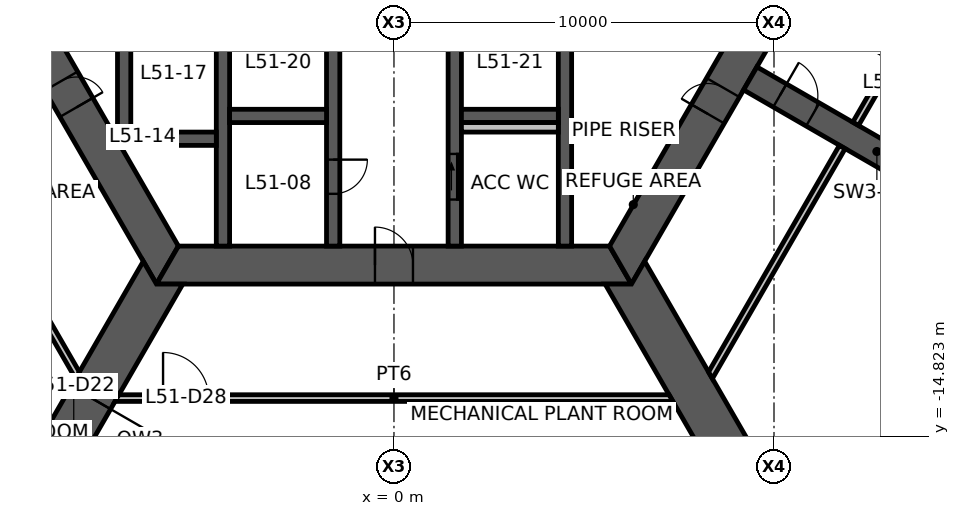
"""IFC4 building model, lengths in metres.
Left out: names, types, materials, properties, quantities, classifications, styles, units other than length and angle.
Written with IfcOpenShell. Run it as: python <this file> out.ifc"""

import sys

from ifc_helpers import new_model, si_unit, direction, frame, frame_2d, origin, place, context, subcontext, project, spatial, polyline, rectangle, outline, extrude, element, fill, save


model = new_model("IFC4")
c1 = context("Model", 3, precision=1e-05, world=origin(), true_north=direction((0.0, 1.0)))
c2 = subcontext(c1, "Body", "Model", "MODEL_VIEW")
j1 = project(units=[si_unit("LENGTHUNIT", "METRE"), si_unit("PLANEANGLEUNIT", "RADIAN")], contexts=[c1])
p1 = place(None, origin())
s1 = spatial("IfcSite", under=j1, at=p1, CompositionType="ELEMENT")
p2 = place(p1, origin())
s2 = spatial("IfcBuilding", under=s1, at=p2, CompositionType="ELEMENT")
p3 = place(p2, frame((0.0, 0.0, 203.3)))
s3 = spatial("IfcBuildingStorey", under=s2, at=p3, CompositionType="ELEMENT", Elevation=203.3)
p4 = place(p3, frame((-11.922, 0.0, 0.0), z_axis=(0.0, 0.0, 1.0), x_axis=(0.500004296715, -0.866022923061, 0.0)))
e1 = element("IfcWall", 1, at=p4, inside=s3, PredefinedType="SHEAR", context=c2, shape_type="SweptSolid", body=[
    extrude(outline(polyline([(-0.289, -0.5), (6.331, -0.5), (7.131, -0.5), (12.211, -0.5), (11.634, 0.5), (7.131, 0.5), (6.331, 0.5), (0.289, 0.5), (-0.289, -0.5)])), origin(), (0.0, 0.0, 1.0), 5.0),
])
p5 = place(p4, frame((6.331, 0.0, 0.0)))
e2 = element("IfcOpeningElement", 2, at=p5, cuts=e1, PredefinedType="OPENING", context=c2, shape_type="SweptSolid", body=[
    extrude(rectangle(XDim=0.8, YDim=2.1, at=frame_2d((0.4, 1.05))), frame((0.0, 0.51, 0.0), z_axis=(0.0, -1.0, 0.0), x_axis=(1.0, 0.0, 0.0)), (0.0, 0.0, 1.0), 1.02),
])
p6 = place(p3, frame((-5.961, -10.325, 0.0), z_axis=(0.0, 0.0, 1.0), x_axis=(1.0, 0.0, 0.0)))
e3 = element("IfcWall", 3, at=p6, inside=s3, PredefinedType="SHEAR", context=c2, shape_type="SweptSolid", body=[
    extrude(outline(polyline([(-0.289, -0.5), (5.461, -0.5), (6.461, -0.5), (12.211, -0.5), (11.634, 0.5), (6.461, 0.5), (5.461, 0.5), (0.289, 0.5), (-0.289, -0.5)])), origin(), (0.0, 0.0, 1.0), 5.0),
])
p7 = place(p6, frame((5.461, 0.0, 0.0)))
e4 = element("IfcOpeningElement", 4, at=p7, cuts=e3, PredefinedType="OPENING", context=c2, shape_type="SweptSolid", body=[
    extrude(rectangle(XDim=1.0, YDim=2.1, at=frame_2d((0.5, 1.05))), frame((0.0, 0.51, 0.0), z_axis=(0.0, -1.0, 0.0), x_axis=(1.0, 0.0, 0.0)), (0.0, 0.0, 1.0), 1.02),
])
p8 = place(p3, frame((5.961, -10.325, 0.0), z_axis=(0.0, 0.0, 1.0), x_axis=(0.500004296715, 0.866022923061, 0.0)))
e5 = element("IfcWall", 5, at=p8, inside=s3, PredefinedType="SHEAR", context=c2, shape_type="SweptSolid", body=[
    extrude(outline(polyline([(-0.289, -0.5), (4.594, -0.5), (5.394, -0.5), (12.211, -0.5), (11.634, 0.5), (5.394, 0.5), (4.594, 0.5), (0.289, 0.5), (-0.289, -0.5)])), origin(), (0.0, 0.0, 1.0), 5.0),
])
p9 = place(p8, frame((4.594, 0.0, 0.0)))
e6 = element("IfcOpeningElement", 6, at=p9, cuts=e5, PredefinedType="OPENING", context=c2, shape_type="SweptSolid", body=[
    extrude(rectangle(XDim=0.8, YDim=2.1, at=frame_2d((0.4, 1.05))), frame((0.0, 0.51, 0.0), z_axis=(0.0, -1.0, 0.0), x_axis=(1.0, 0.0, 0.0)), (0.0, 0.0, 1.0), 1.02),
])
p10 = place(p3, frame((9.375, -5.413, 0.0), z_axis=(0.0, 0.0, 1.0), x_axis=(0.866032377459, -0.499987921047, 0.0)))
e7 = element("IfcWall", 7, at=p10, inside=s3, PredefinedType="SHEAR", context=c2, shape_type="SweptSolid", body=[
    extrude(rectangle(XDim=7.696, YDim=0.7, at=frame_2d((3.848, 0.0))), origin(), (0.0, 0.0, 1.0), 5.0),
])
p11 = place(p10, frame((0.9, 0.0, 0.0)))
e8 = element("IfcOpeningElement", 8, at=p11, cuts=e7, PredefinedType="OPENING", context=c2, shape_type="SweptSolid", body=[
    extrude(rectangle(XDim=1.0, YDim=2.1, at=frame_2d((0.5, 1.05))), frame((0.0, 0.36, 0.0), z_axis=(0.0, -1.0, 0.0), x_axis=(1.0, 0.0, 0.0)), (0.0, 0.0, 1.0), 0.72),
])
p12 = place(p3, frame((-6.25, -10.825, -1.15), z_axis=(0.0, 0.0, 1.0), x_axis=(-0.50000045744, -0.866025139681, 0.0)))
e9 = element("IfcWall", 9, at=p12, inside=s3, PredefinedType="SHEAR", context=c2, shape_type="SweptSolid", body=[
    extrude(outline(polyline([(-0.346, -0.6), (3.453, -0.6), (5.253, -0.6), (7.5, -0.6), (7.5, 0.6), (5.253, 0.6), (3.453, 0.6), (-0.346, 0.6), (0.0, 0.0), (-0.346, -0.6)])), origin(), (0.0, 0.0, 1.0), 6.15),
])
p13 = place(p12, frame((3.453, 0.0, 1.15)))
e10 = element("IfcOpeningElement", 10, at=p13, cuts=e9, PredefinedType="OPENING", context=c2, shape_type="SweptSolid", body=[
    extrude(rectangle(XDim=1.8, YDim=2.4, at=frame_2d((0.9, 1.2))), frame((0.0, 0.61, 0.0), z_axis=(0.0, -1.0, 0.0), x_axis=(1.0, 0.0, 0.0)), (0.0, 0.0, 1.0), 1.22),
])
p14 = place(p3, frame((6.25, -10.825, -1.15), z_axis=(0.0, 0.0, 1.0), x_axis=(0.50000045744, -0.866025139681, 0.0)))
e11 = element("IfcWall", 11, at=p14, inside=s3, PredefinedType="SHEAR", context=c2, shape_type="SweptSolid", body=[
    extrude(outline(polyline([(-0.346, -0.6), (7.5, -0.6), (7.5, 0.6), (-0.346, 0.6), (0.0, 0.0), (-0.346, -0.6)])), origin(), (0.0, 0.0, 1.0), 6.15),
])
p15 = place(p3, frame((-1.6, -3.775, 0.0), z_axis=(0.0, 0.0, 1.0), x_axis=(0.0, -1.0, 0.0)))
e12 = element("IfcWall", 12, at=p15, inside=s3, PredefinedType="SHEAR", context=c2, shape_type="SweptSolid", body=[
    extrude(rectangle(XDim=6.05, YDim=0.35, at=frame_2d((3.025, 0.0))), origin(), (0.0, 0.0, 1.0), 5.0),
])
p16 = place(p15, frame((3.775, 0.0, 0.0)))
e13 = element("IfcOpeningElement", 13, at=p16, cuts=e12, PredefinedType="OPENING", context=c2, shape_type="SweptSolid", body=[
    extrude(rectangle(XDim=0.9, YDim=2.1, at=frame_2d((0.45, 1.05))), frame((0.0, 0.185, 0.0), z_axis=(0.0, -1.0, 0.0), x_axis=(1.0, 0.0, 0.0)), (0.0, 0.0, 1.0), 0.37),
])
p17 = place(p3, frame((1.6, -3.775, 0.0), z_axis=(0.0, 0.0, 1.0), x_axis=(0.0, -1.0, 0.0)))
e14 = element("IfcWall", 14, at=p17, inside=s3, PredefinedType="SHEAR", context=c2, shape_type="SweptSolid", body=[
    extrude(rectangle(XDim=6.05, YDim=0.35, at=frame_2d((3.025, 0.0))), origin(), (0.0, 0.0, 1.0), 5.0),
])
p18 = place(p17, frame((3.625, 0.0, 0.0)))
e15 = element("IfcOpeningElement", 15, at=p18, cuts=e14, PredefinedType="OPENING", context=c2, shape_type="SweptSolid", body=[
    extrude(rectangle(XDim=1.2, YDim=2.1, at=frame_2d((0.6, 1.05))), frame((0.0, 0.185, 0.0), z_axis=(0.0, -1.0, 0.0), x_axis=(1.0, 0.0, 0.0)), (0.0, 0.0, 1.0), 0.37),
])
for number, where, z_axis, x_axis in (
    (16, (-4.5, -3.775, 0.0), (0.0, 0.0, 1.0), (0.0, -1.0, 0.0)),
    (17, (4.5, -3.775, 0.0), (0.0, 0.0, 1.0), (0.0, -1.0, 0.0)),
):
    element("IfcWall", number, at=place(p3, frame(where, z_axis=z_axis, x_axis=x_axis)), inside=s3, PredefinedType="SHEAR", context=c2, shape_type="SweptSolid", body=[
        extrude(rectangle(XDim=6.05, YDim=0.35, at=frame_2d((3.025, 0.0))), origin(), (0.0, 0.0, 1.0), 5.0),
    ])
for number, where, z_axis, x_axis in (
    (18, (-4.325, -6.4, 0.0), (0.0, 0.0, 1.0), (1.0, 0.0, 0.0)),
    (19, (1.775, -6.4, 0.0), (0.0, 0.0, 1.0), (1.0, 0.0, 0.0)),
):
    element("IfcWall", number, at=place(p3, frame(where, z_axis=z_axis, x_axis=x_axis)), inside=s3, PredefinedType="SHEAR", context=c2, shape_type="SweptSolid", body=[
        extrude(rectangle(XDim=2.55, YDim=0.35, at=frame_2d((1.275, 0.0))), origin(), (0.0, 0.0, 1.0), 5.0),
    ])
p19 = place(p3, frame((-6.925, -7.0, 0.0), z_axis=(0.0, 0.0, 1.0), x_axis=(1.0, 0.0, 0.0)))
e20 = element("IfcWall", 20, at=p19, inside=s3, PredefinedType="SHEAR", context=c2, shape_type="SweptSolid", body=[
    extrude(rectangle(XDim=2.25, YDim=0.35, at=frame_2d((1.125, 0.0))), origin(), (0.0, 0.0, 1.0), 5.0),
])
p20 = place(p3, frame((-7.1, -3.775, 0.0), z_axis=(0.0, 0.0, 1.0), x_axis=(0.0, -1.0, 0.0)))
e21 = element("IfcWall", 21, at=p20, inside=s3, PredefinedType="SHEAR", context=c2, shape_type="SweptSolid", body=[
    extrude(outline(polyline([(0.0, -0.175), (3.274, -0.175), (3.4, 0.0), (3.4, 0.175), (0.0, 0.175), (0.0, -0.175)])), origin(), (0.0, 0.0, 1.0), 5.0),
])
p21 = place(p3, frame((1.775, -6.7, 0.0), z_axis=(0.0, 0.0, 1.0), x_axis=(1.0, 0.0, 0.0)))
e22 = element("IfcWall", 22, at=p21, inside=s3, PredefinedType="PLUMBINGWALL", context=c2, shape_type="SweptSolid", body=[
    extrude(rectangle(XDim=2.55, YDim=0.25, at=frame_2d((1.275, 0.0))), origin(), (0.0, 0.0, 1.0), 5.0),
])
p22 = place(p3, frame((-11.795, -7.22, 0.0), z_axis=(0.0, 0.0, 1.0), x_axis=(0.49999776677, -0.866026693137, 0.0)))
e23 = element("IfcWall", 23, at=p22, inside=s3, PredefinedType="PARTITIONING", context=c2, shape_type="SweptSolid", body=[
    extrude(outline(polyline([(0.0, -0.087), (1.9, -0.087), (3.1, -0.087), (6.985, -0.087), (6.884, 0.087), (3.1, 0.087), (1.9, 0.087), (0.0, 0.087), (0.0, -0.087)])), origin(), (0.0, 0.0, 1.0), 4.8),
])
p23 = place(p22, frame((1.9, 0.0, 0.0)))
e24 = element("IfcOpeningElement", 24, at=p23, cuts=e23, PredefinedType="OPENING", context=c2, shape_type="SweptSolid", body=[
    extrude(rectangle(XDim=1.2, YDim=2.1, at=frame_2d((0.6, 1.05))), frame((0.0, 0.098, 0.0), z_axis=(0.0, -1.0, 0.0), x_axis=(1.0, 0.0, 0.0)), (0.0, 0.0, 1.0), 0.195),
])
p24 = place(p3, frame((12.15, -6.605, 0.0), z_axis=(0.0, 0.0, 1.0), x_axis=(0.499986605379, 0.866033137035, 0.0)))
e25 = element("IfcWall", 25, at=p24, inside=s3, PredefinedType="PARTITIONING", context=c2, shape_type="SweptSolid", body=[
    extrude(outline(polyline([(0.0, -0.087), (1.9, -0.087), (3.1, -0.087), (6.984, -0.087), (6.883, 0.087), (3.1, 0.087), (1.9, 0.087), (0.0, 0.087), (0.0, -0.087)])), origin(), (0.0, 0.0, 1.0), 4.8),
])
p25 = place(p24, frame((1.9, 0.0, 0.0)))
e26 = element("IfcOpeningElement", 26, at=p25, cuts=e25, PredefinedType="OPENING", context=c2, shape_type="SweptSolid", body=[
    extrude(rectangle(XDim=1.2, YDim=2.1, at=frame_2d((0.6, 1.05))), frame((0.0, 0.098, 0.0), z_axis=(0.0, -1.0, 0.0), x_axis=(1.0, 0.0, 0.0)), (0.0, 0.0, 1.0), 0.195),
])
p26 = place(p3, frame((-7.289, -13.825, 0.0), z_axis=(0.0, 0.0, 1.0), x_axis=(1.0, 0.0, 0.0)))
e27 = element("IfcWall", 27, at=p26, inside=s3, PredefinedType="PARTITIONING", context=c2, shape_type="SweptSolid", body=[
    extrude(outline(polyline([(-0.051, -0.087), (1.213, -0.087), (2.413, -0.087), (14.629, -0.087), (14.528, 0.087), (2.413, 0.087), (1.213, 0.087), (0.051, 0.087), (-0.051, -0.087)])), origin(), (0.0, 0.0, 1.0), 4.8),
])
p27 = place(p26, frame((1.213, 0.0, 0.0)))
e28 = element("IfcOpeningElement", 28, at=p27, cuts=e27, PredefinedType="OPENING", context=c2, shape_type="SweptSolid", body=[
    extrude(rectangle(XDim=1.2, YDim=2.1, at=frame_2d((0.6, 1.05))), frame((0.0, 0.098, 0.0), z_axis=(0.0, -1.0, 0.0), x_axis=(1.0, 0.0, 0.0)), (0.0, 0.0, 1.0), 0.195),
])
p28 = place(p3, frame((8.328, -13.225, 0.0), z_axis=(0.0, 0.0, 1.0), x_axis=(0.49999776677, 0.866026693137, 0.0)))
e29 = element("IfcWall", 29, at=p28, inside=s3, PredefinedType="PARTITIONING", context=c2, shape_type="SweptSolid", body=[
    extrude(outline(polyline([(-0.051, -0.087), (6.934, -0.087), (6.934, 0.087), (0.051, 0.087), (-0.051, -0.087)])), origin(), (0.0, 0.0, 1.0), 4.8),
])
p29 = place(p7, origin())
e30 = element("IfcDoor", 30, at=p29, inside=s3, OperationType="SINGLE_SWING_LEFT", PredefinedType="DOOR", context=c2, shape_type="SweptSolid", body=[
    extrude(rectangle(XDim=1.0, YDim=2.1, at=frame_2d((0.5, 1.05))), frame((0.0, 0.025, 0.0), z_axis=(0.0, -1.0, 0.0), x_axis=(1.0, 0.0, 0.0)), (0.0, 0.0, 1.0), 0.05),
])
fill(e4, e30)
p30 = place(p9, origin())
e31 = element("IfcDoor", 31, at=p30, inside=s3, OperationType="SINGLE_SWING_LEFT", PredefinedType="DOOR", context=c2, shape_type="SweptSolid", body=[
    extrude(rectangle(XDim=0.8, YDim=2.1, at=frame_2d((0.4, 1.05))), frame((0.0, 0.025, 0.0), z_axis=(0.0, -1.0, 0.0), x_axis=(1.0, 0.0, 0.0)), (0.0, 0.0, 1.0), 0.05),
])
fill(e6, e31)
p31 = place(p5, origin())
e32 = element("IfcDoor", 32, at=p31, inside=s3, OperationType="SINGLE_SWING_RIGHT", PredefinedType="DOOR", context=c2, shape_type="SweptSolid", body=[
    extrude(rectangle(XDim=0.8, YDim=2.1, at=frame_2d((0.4, 1.05))), frame((0.0, 0.025, 0.0), z_axis=(0.0, -1.0, 0.0), x_axis=(1.0, 0.0, 0.0)), (0.0, 0.0, 1.0), 0.05),
])
fill(e2, e32)
p32 = place(p18, origin())
e33 = element("IfcDoor", 33, at=p32, inside=s3, OperationType="SLIDING_TO_LEFT", PredefinedType="DOOR", context=c2, shape_type="SweptSolid", body=[
    extrude(rectangle(XDim=1.2, YDim=2.1, at=frame_2d((0.6, 1.05))), frame((0.0, 0.025, 0.0), z_axis=(0.0, -1.0, 0.0), x_axis=(1.0, 0.0, 0.0)), (0.0, 0.0, 1.0), 0.05),
])
fill(e15, e33)
p33 = place(p16, origin())
e34 = element("IfcDoor", 34, at=p33, inside=s3, OperationType="SINGLE_SWING_LEFT", PredefinedType="DOOR", context=c2, shape_type="SweptSolid", body=[
    extrude(rectangle(XDim=0.9, YDim=2.1, at=frame_2d((0.45, 1.05))), frame((0.0, 0.025, 0.0), z_axis=(0.0, -1.0, 0.0), x_axis=(1.0, 0.0, 0.0)), (0.0, 0.0, 1.0), 0.05),
])
fill(e13, e34)
p34 = place(p11, origin())
e35 = element("IfcDoor", 35, at=p34, inside=s3, OperationType="SINGLE_SWING_LEFT", PredefinedType="DOOR", context=c2, shape_type="SweptSolid", body=[
    extrude(rectangle(XDim=1.0, YDim=2.1, at=frame_2d((0.5, 1.05))), frame((0.0, 0.025, 0.0), z_axis=(0.0, -1.0, 0.0), x_axis=(1.0, 0.0, 0.0)), (0.0, 0.0, 1.0), 0.05),
])
fill(e8, e35)
p35 = place(p13, origin())
e36 = element("IfcDoor", 36, at=p35, inside=s3, OperationType="DOUBLE_DOOR_SINGLE_SWING", PredefinedType="DOOR", context=c2, shape_type="SweptSolid", body=[
    extrude(rectangle(XDim=1.8, YDim=2.4, at=frame_2d((0.9, 1.2))), frame((0.0, 0.025, 0.0), z_axis=(0.0, -1.0, 0.0), x_axis=(1.0, 0.0, 0.0)), (0.0, 0.0, 1.0), 0.05),
])
fill(e10, e36)
p36 = place(p27, origin())
e37 = element("IfcDoor", 37, at=p36, inside=s3, OperationType="DOUBLE_DOOR_SINGLE_SWING", PredefinedType="DOOR", context=c2, shape_type="SweptSolid", body=[
    extrude(rectangle(XDim=1.2, YDim=2.1, at=frame_2d((0.6, 1.05))), frame((0.0, 0.025, 0.0), z_axis=(0.0, -1.0, 0.0), x_axis=(1.0, 0.0, 0.0)), (0.0, 0.0, 1.0), 0.05),
])
fill(e28, e37)
save(model, sys.argv[1])
